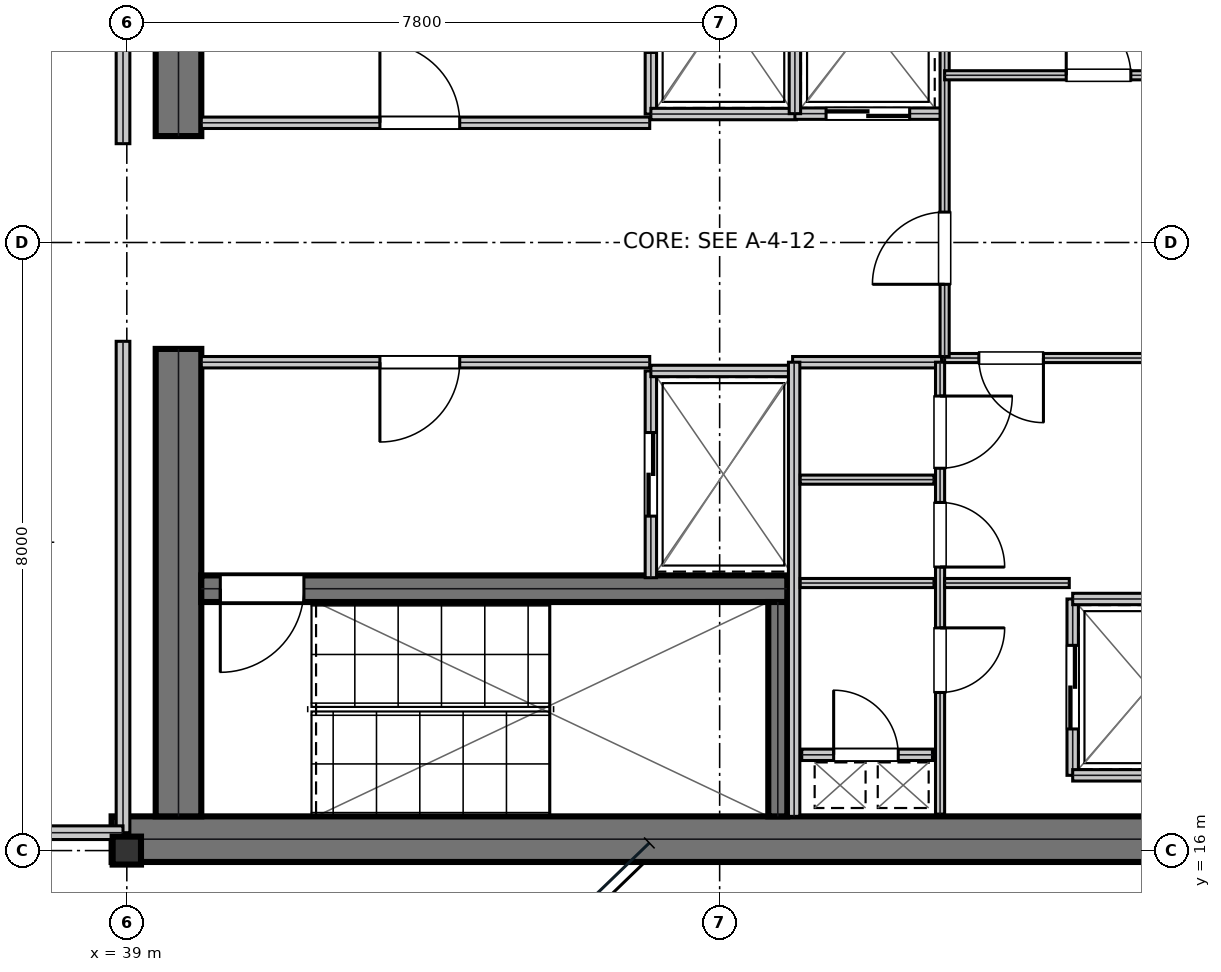
"""IFC4 building model, lengths in metres.
Left out: names, types, materials, properties, quantities, classifications, styles, units other than length and angle.
Written with IfcOpenShell. Run it as: python <this file> out.ifc"""

import sys

from ifc_helpers import new_model, si_unit, direction, frame, frame_2d, origin, origin_2d, place, context, subcontext, project, spatial, rectangle, i_section, extrude, element, fill, save


model = new_model("IFC4")
c1 = context("Model", 3, precision=1e-05, world=origin(), true_north=direction((0.0, 1.0)))
c2 = subcontext(c1, "Body", "Model", "MODEL_VIEW")
j1 = project(units=[si_unit("LENGTHUNIT", "METRE"), si_unit("PLANEANGLEUNIT", "RADIAN")], contexts=[c1])
p1 = place(None, origin())
s1 = spatial("IfcSite", under=j1, at=p1, CompositionType="ELEMENT")
p2 = place(p1, origin())
s2 = spatial("IfcBuilding", under=s1, at=p2, CompositionType="ELEMENT")
p3 = place(p2, frame((0.0, 0.0, 315.45)))
s3 = spatial("IfcBuildingStorey", under=s2, at=p3, CompositionType="ELEMENT", Elevation=315.45)
p4 = place(p3, frame((38.8, 16.15, 0.0), z_axis=(0.0, 0.0, 1.0), x_axis=(1.0, 0.0, 0.0)))
e1 = element("IfcWall", 1, at=p4, inside=s3, PredefinedType="SHEAR", context=c2, shape_type="SweptSolid", body=[
    extrude(rectangle(XDim=16.0, YDim=0.6, at=frame_2d((8.0, 0.0))), origin(), (0.0, 0.0, 1.0), 3.78),
])
for number, where, z_axis, x_axis in (
    (2, (39.68, 16.45, 0.0), (0.0, 0.0, 1.0), (0.0, 1.0, 0.0)),
    (3, (39.68, 25.4, 0.0), (0.0, 0.0, 1.0), (0.0, 1.0, 0.0)),
):
    element("IfcWall", number, at=place(p3, frame(where, z_axis=z_axis, x_axis=x_axis)), inside=s3, PredefinedType="SHEAR", context=c2, shape_type="SweptSolid", body=[
        extrude(rectangle(XDim=6.15, YDim=0.6, at=frame_2d((3.075, 0.0))), origin(), (0.0, 0.0, 1.0), 3.78),
    ])
p5 = place(p3, frame((39.98, 19.445, 0.0), z_axis=(0.0, 0.0, 1.0), x_axis=(1.0, 0.0, 0.0)))
e4 = element("IfcWall", 4, at=p5, inside=s3, PredefinedType="SHEAR", context=c2, shape_type="SweptSolid", body=[
    extrude(rectangle(XDim=7.71, YDim=0.35, at=frame_2d((3.855, 0.0))), origin(), (0.0, 0.0, 1.0), 3.78),
])
p6 = place(p5, frame((0.25, 0.0, 0.0)))
e5 = element("IfcOpeningElement", 5, at=p6, cuts=e4, PredefinedType="OPENING", context=c2, shape_type="SweptSolid", body=[
    extrude(rectangle(XDim=1.1, YDim=2.15, at=frame_2d((0.55, 1.075))), frame((0.0, 0.185, 0.0), z_axis=(0.0, -1.0, 0.0), x_axis=(1.0, 0.0, 0.0)), (0.0, 0.0, 1.0), 0.37),
])
p7 = place(p3, frame((47.565, 16.45, 0.0), z_axis=(0.0, 0.0, 1.0), x_axis=(0.0, 1.0, 0.0)))
e6 = element("IfcWall", 6, at=p7, inside=s3, PredefinedType="SHEAR", context=c2, shape_type="SweptSolid", body=[
    extrude(rectangle(XDim=2.82, YDim=0.25, at=frame_2d((1.41, 0.0))), origin(), (0.0, 0.0, 1.0), 3.78),
])
p8 = place(p3, frame((39.0, 16.0, 0.0), z_axis=(0.0, 0.0, 1.0), x_axis=(1.0, 0.0, 0.0)))
e7 = element("IfcColumn", 7, at=p8, inside=s3, PredefinedType="COLUMN", context=c2, shape_type="SweptSolid", body=[
    extrude(i_section(OverallWidth=0.373, OverallDepth=0.368, WebThickness=0.015, FlangeThickness=0.024, at=origin_2d()), origin(), (0.0, 0.0, 1.0), 4.044),
])
p9 = place(p3, frame((39.98, 25.575, 0.0), z_axis=(0.0, 0.0, 1.0), x_axis=(1.0, 0.0, 0.0)))
e8 = element("IfcWall", 8, at=p9, inside=s3, PredefinedType="PARTITIONING", context=c2, shape_type="SweptSolid", body=[
    extrude(rectangle(XDim=5.9, YDim=0.15, at=frame_2d((2.95, 0.0))), origin(), (0.0, 0.0, 1.0), 3.78),
])
p10 = place(p9, frame((2.35, 0.0, 0.0)))
e9 = element("IfcOpeningElement", 9, at=p10, cuts=e8, PredefinedType="OPENING", context=c2, shape_type="SweptSolid", body=[
    extrude(rectangle(XDim=1.05, YDim=2.15, at=frame_2d((0.525, 1.075))), frame((0.0, 0.085, 0.0), z_axis=(0.0, -1.0, 0.0), x_axis=(1.0, 0.0, 0.0)), (0.0, 0.0, 1.0), 0.17),
])
p11 = place(p3, frame((39.98, 22.425, 0.0), z_axis=(0.0, 0.0, 1.0), x_axis=(1.0, 0.0, 0.0)))
e10 = element("IfcWall", 10, at=p11, inside=s3, PredefinedType="PARTITIONING", context=c2, shape_type="SweptSolid", body=[
    extrude(rectangle(XDim=5.9, YDim=0.15, at=frame_2d((2.95, 0.0))), origin(), (0.0, 0.0, 1.0), 3.78),
])
p12 = place(p11, frame((2.35, 0.0, 0.0)))
e11 = element("IfcOpeningElement", 11, at=p12, cuts=e10, PredefinedType="OPENING", context=c2, shape_type="SweptSolid", body=[
    extrude(rectangle(XDim=1.05, YDim=2.15, at=frame_2d((0.525, 1.075))), frame((0.0, 0.085, 0.0), z_axis=(0.0, -1.0, 0.0), x_axis=(1.0, 0.0, 0.0)), (0.0, 0.0, 1.0), 0.17),
])
p13 = place(p3, frame((45.895, 25.69, 0.0), z_axis=(0.0, 0.0, 1.0), x_axis=(0.0, 1.0, 0.0)))
e12 = element("IfcWall", 12, at=p13, inside=s3, PredefinedType="PARTITIONING", context=c2, shape_type="SweptSolid", body=[
    extrude(rectangle(XDim=2.72, YDim=0.15, at=frame_2d((1.36, 0.0))), origin(), (0.0, 0.0, 1.0), 3.78),
])
p14 = place(p13, frame((0.81, 0.0, 0.0)))
e13 = element("IfcOpeningElement", 13, at=p14, cuts=e12, PredefinedType="OPENING", context=c2, shape_type="SweptSolid", body=[
    extrude(rectangle(XDim=1.1, YDim=2.15, at=frame_2d((0.55, 1.075))), frame((0.0, 0.085, 0.0), z_axis=(0.0, -1.0, 0.0), x_axis=(1.0, 0.0, 0.0)), (0.0, 0.0, 1.0), 0.17),
])
p15 = place(p3, frame((45.895, 25.69, 0.0), z_axis=(0.0, 0.0, 1.0), x_axis=(1.0, 0.0, 0.0)))
e14 = element("IfcWall", 14, at=p15, inside=s3, PredefinedType="PARTITIONING", context=c2, shape_type="SweptSolid", body=[
    extrude(rectangle(XDim=1.915, YDim=0.15, at=frame_2d((0.958, 0.0))), origin(), (0.0, 0.0, 1.0), 3.78),
])
p16 = place(p3, frame((45.895, 19.59, 0.0), z_axis=(0.0, 0.0, 1.0), x_axis=(0.0, 1.0, 0.0)))
e15 = element("IfcWall", 15, at=p16, inside=s3, PredefinedType="PARTITIONING", context=c2, shape_type="SweptSolid", body=[
    extrude(rectangle(XDim=2.72, YDim=0.15, at=frame_2d((1.36, 0.0))), origin(), (0.0, 0.0, 1.0), 3.78),
])
p17 = place(p16, frame((0.81, 0.0, 0.0)))
e16 = element("IfcOpeningElement", 16, at=p17, cuts=e15, PredefinedType="OPENING", context=c2, shape_type="SweptSolid", body=[
    extrude(rectangle(XDim=1.1, YDim=2.15, at=frame_2d((0.55, 1.075))), frame((0.0, 0.085, 0.0), z_axis=(0.0, -1.0, 0.0), x_axis=(1.0, 0.0, 0.0)), (0.0, 0.0, 1.0), 0.17),
])
p18 = place(p3, frame((45.895, 22.31, 0.0), z_axis=(0.0, 0.0, 1.0), x_axis=(1.0, 0.0, 0.0)))
e17 = element("IfcWall", 17, at=p18, inside=s3, PredefinedType="PARTITIONING", context=c2, shape_type="SweptSolid", body=[
    extrude(rectangle(XDim=1.915, YDim=0.15, at=frame_2d((0.958, 0.0))), origin(), (0.0, 0.0, 1.0), 3.78),
])
p19 = place(p3, frame((47.79, 25.695, 0.0), z_axis=(0.0, 0.0, 1.0), x_axis=(1.0, 0.0, 0.0)))
e18 = element("IfcWall", 18, at=p19, inside=s3, PredefinedType="PARTITIONING", context=c2, shape_type="SweptSolid", body=[
    extrude(rectangle(XDim=1.92, YDim=0.15, at=frame_2d((0.96, 0.0))), origin(), (0.0, 0.0, 1.0), 3.78),
])
p20 = place(p19, frame((0.41, 0.0, 0.0)))
e19 = element("IfcOpeningElement", 19, at=p20, cuts=e18, PredefinedType="OPENING", context=c2, shape_type="SweptSolid", body=[
    extrude(rectangle(XDim=1.1, YDim=2.15, at=frame_2d((0.55, 1.075))), frame((0.0, 0.085, 0.0), z_axis=(0.0, -1.0, 0.0), x_axis=(1.0, 0.0, 0.0)), (0.0, 0.0, 1.0), 0.17),
])
p21 = place(p3, frame((47.79, 25.695, 0.0), z_axis=(0.0, 0.0, 1.0), x_axis=(0.0, 1.0, 0.0)))
e20 = element("IfcWall", 20, at=p21, inside=s3, PredefinedType="PARTITIONING", context=c2, shape_type="SweptSolid", body=[
    extrude(rectangle(XDim=2.415, YDim=0.15, at=frame_2d((1.208, 0.0))), origin(), (0.0, 0.0, 1.0), 3.78),
])
p22 = place(p3, frame((51.445, 16.99, 0.0), z_axis=(0.0, 0.0, 1.0), x_axis=(0.0, 1.0, 0.0)))
e21 = element("IfcWall", 21, at=p22, inside=s3, PredefinedType="PARTITIONING", context=c2, shape_type="SweptSolid", body=[
    extrude(rectangle(XDim=2.32, YDim=0.15, at=frame_2d((1.16, 0.0))), origin(), (0.0, 0.0, 1.0), 3.78),
])
p23 = place(p22, frame((0.61, 0.0, 0.0)))
e22 = element("IfcOpeningElement", 22, at=p23, cuts=e21, PredefinedType="OPENING", context=c2, shape_type="SweptSolid", body=[
    extrude(rectangle(XDim=1.1, YDim=2.15, at=frame_2d((0.55, 1.075))), frame((0.0, 0.085, 0.0), z_axis=(0.0, -1.0, 0.0), x_axis=(1.0, 0.0, 0.0)), (0.0, 0.0, 1.0), 0.17),
])
for number, where, z_axis, x_axis in (
    (23, (51.445, 16.99, 0.0), (0.0, 0.0, 1.0), (1.0, 0.0, 0.0)),
    (24, (51.445, 19.31, 0.0), (0.0, 0.0, 1.0), (1.0, 0.0, 0.0)),
):
    element("IfcWall", number, at=place(p3, frame(where, z_axis=z_axis, x_axis=x_axis)), inside=s3, PredefinedType="PARTITIONING", context=c2, shape_type="SweptSolid", body=[
        extrude(rectangle(XDim=2.015, YDim=0.15, at=frame_2d((1.007, 0.0))), origin(), (0.0, 0.0, 1.0), 3.78),
    ])
p24 = place(p3, frame((47.88, 17.26, 0.0), z_axis=(0.0, 0.0, 1.0), x_axis=(1.0, 0.0, 0.0)))
e25 = element("IfcWall", 25, at=p24, inside=s3, PredefinedType="PARTITIONING", context=c2, shape_type="SweptSolid", body=[
    extrude(rectangle(XDim=1.72, YDim=0.15, at=frame_2d((0.86, 0.0))), origin(), (0.0, 0.0, 1.0), 3.78),
])
p25 = place(p24, frame((0.42, 0.0, 0.0)))
e26 = element("IfcOpeningElement", 26, at=p25, cuts=e25, PredefinedType="OPENING", context=c2, shape_type="SweptSolid", body=[
    extrude(rectangle(XDim=0.85, YDim=2.15, at=frame_2d((0.425, 1.075))), frame((0.0, 0.085, 0.0), z_axis=(0.0, -1.0, 0.0), x_axis=(1.0, 0.0, 0.0)), (0.0, 0.0, 1.0), 0.17),
])
p26 = place(p3, frame((47.76, 22.425, 0.0), z_axis=(0.0, 0.0, 1.0), x_axis=(1.0, 0.0, 0.0)))
e27 = element("IfcWall", 27, at=p26, inside=s3, PredefinedType="PARTITIONING", context=c2, shape_type="SweptSolid", body=[
    extrude(rectangle(XDim=1.96, YDim=0.15, at=frame_2d((0.98, 0.0))), origin(), (0.0, 0.0, 1.0), 3.78),
])
p27 = place(p3, frame((47.78, 16.45, 0.0), z_axis=(0.0, 0.0, 1.0), x_axis=(0.0, 1.0, 0.0)))
e28 = element("IfcWall", 28, at=p27, inside=s3, PredefinedType="PARTITIONING", context=c2, shape_type="SweptSolid", body=[
    extrude(rectangle(XDim=5.975, YDim=0.15, at=frame_2d((2.988, 0.0))), origin(), (0.0, 0.0, 1.0), 3.78),
])
for number, where, z_axis, x_axis in (
    (29, (47.86, 19.52, 0.0), (0.0, 0.0, 1.0), (1.0, 0.0, 0.0)),
    (30, (47.86, 20.88, 0.0), (0.0, 0.0, 1.0), (1.0, 0.0, 0.0)),
):
    element("IfcWall", number, at=place(p3, frame(where, z_axis=z_axis, x_axis=x_axis)), inside=s3, PredefinedType="PARTITIONING", context=c2, shape_type="SweptSolid", body=[
        extrude(rectangle(XDim=1.76, YDim=0.12, at=frame_2d((0.88, 0.0))), origin(), (0.0, 0.0, 1.0), 3.78),
    ])
p28 = place(p3, frame((49.7, 16.48, 0.0), z_axis=(0.0, 0.0, 1.0), x_axis=(0.0, 1.0, 0.0)))
e31 = element("IfcWall", 31, at=p28, inside=s3, PredefinedType="PARTITIONING", context=c2, shape_type="SweptSolid", body=[
    extrude(rectangle(XDim=5.945, YDim=0.12, at=frame_2d((2.973, 0.0))), origin(), (0.0, 0.0, 1.0), 3.78),
])
p29 = place(p28, frame((1.6, 0.0, 0.0)))
e32 = element("IfcOpeningElement", 32, at=p29, cuts=e31, PredefinedType="OPENING", context=c2, shape_type="SweptSolid", body=[
    extrude(rectangle(XDim=0.85, YDim=2.15, at=frame_2d((0.425, 1.075))), frame((0.0, 0.07, 0.0), z_axis=(0.0, -1.0, 0.0), x_axis=(1.0, 0.0, 0.0)), (0.0, 0.0, 1.0), 0.14),
])
p30 = place(p28, frame((3.25, 0.0, 0.0)))
e33 = element("IfcOpeningElement", 33, at=p30, cuts=e31, PredefinedType="OPENING", context=c2, shape_type="SweptSolid", body=[
    extrude(rectangle(XDim=0.85, YDim=2.15, at=frame_2d((0.425, 1.075))), frame((0.0, 0.07, 0.0), z_axis=(0.0, -1.0, 0.0), x_axis=(1.0, 0.0, 0.0)), (0.0, 0.0, 1.0), 0.14),
])
p31 = place(p28, frame((4.55, 0.0, 0.0)))
e34 = element("IfcOpeningElement", 34, at=p31, cuts=e31, PredefinedType="OPENING", context=c2, shape_type="SweptSolid", body=[
    extrude(rectangle(XDim=0.95, YDim=2.15, at=frame_2d((0.475, 1.075))), frame((0.0, 0.07, 0.0), z_axis=(0.0, -1.0, 0.0), x_axis=(1.0, 0.0, 0.0)), (0.0, 0.0, 1.0), 0.14),
])
p32 = place(p3, frame((49.76, 22.48, 0.0), z_axis=(0.0, 0.0, 1.0), x_axis=(1.0, 0.0, 0.0)))
e35 = element("IfcWall", 35, at=p32, inside=s3, PredefinedType="PARTITIONING", context=c2, shape_type="SweptSolid", body=[
    extrude(rectangle(XDim=3.9, YDim=0.12, at=frame_2d((1.95, 0.0))), origin(), (0.0, 0.0, 1.0), 3.78),
])
p33 = place(p32, frame((0.45, 0.0, 0.0)))
e36 = element("IfcOpeningElement", 36, at=p33, cuts=e35, PredefinedType="OPENING", context=c2, shape_type="SweptSolid", body=[
    extrude(rectangle(XDim=0.85, YDim=2.15, at=frame_2d((0.425, 1.075))), frame((0.0, 0.07, 0.0), z_axis=(0.0, -1.0, 0.0), x_axis=(1.0, 0.0, 0.0)), (0.0, 0.0, 1.0), 0.14),
])
p34 = place(p3, frame((49.76, 19.52, 0.0), z_axis=(0.0, 0.0, 1.0), x_axis=(1.0, 0.0, 0.0)))
e37 = element("IfcWall", 37, at=p34, inside=s3, PredefinedType="PARTITIONING", context=c2, shape_type="SweptSolid", body=[
    extrude(rectangle(XDim=1.64, YDim=0.12, at=frame_2d((0.82, 0.0))), origin(), (0.0, 0.0, 1.0), 3.78),
])
p35 = place(p3, frame((49.76, 22.5, 0.0), z_axis=(0.0, 0.0, 1.0), x_axis=(0.0, 1.0, 0.0)))
e38 = element("IfcWall", 38, at=p35, inside=s3, PredefinedType="PARTITIONING", context=c2, shape_type="SweptSolid", body=[
    extrude(rectangle(XDim=5.72, YDim=0.12, at=frame_2d((2.86, 0.0))), origin(), (0.0, 0.0, 1.0), 3.78),
])
p36 = place(p35, frame((0.95, 0.0, 0.0)))
e39 = element("IfcOpeningElement", 39, at=p36, cuts=e38, PredefinedType="OPENING", context=c2, shape_type="SweptSolid", body=[
    extrude(rectangle(XDim=0.95, YDim=2.15, at=frame_2d((0.475, 1.075))), frame((0.0, 0.07, 0.0), z_axis=(0.0, -1.0, 0.0), x_axis=(1.0, 0.0, 0.0)), (0.0, 0.0, 1.0), 0.14),
])
p37 = place(p3, frame((49.76, 26.2, 0.0), z_axis=(0.0, 0.0, 1.0), x_axis=(1.0, 0.0, 0.0)))
e40 = element("IfcWall", 40, at=p37, inside=s3, PredefinedType="PARTITIONING", context=c2, shape_type="SweptSolid", body=[
    extrude(rectangle(XDim=3.9, YDim=0.12, at=frame_2d((1.95, 0.0))), origin(), (0.0, 0.0, 1.0), 3.78),
])
p38 = place(p37, frame((1.6, 0.0, 0.0)))
e41 = element("IfcOpeningElement", 41, at=p38, cuts=e40, PredefinedType="OPENING", context=c2, shape_type="SweptSolid", body=[
    extrude(rectangle(XDim=0.85, YDim=2.15, at=frame_2d((0.425, 1.075))), frame((0.0, 0.07, 0.0), z_axis=(0.0, -1.0, 0.0), x_axis=(1.0, 0.0, 0.0)), (0.0, 0.0, 1.0), 0.14),
])
p39 = place(p3, frame((38.95, 16.235, 0.0), z_axis=(0.0, 0.0, 1.0), x_axis=(0.0, 1.0, 0.0)))
e42 = element("IfcWall", 42, at=p39, inside=s3, PredefinedType="SOLIDWALL", context=c2, shape_type="SweptSolid", body=[
    extrude(rectangle(XDim=6.465, YDim=0.18, at=frame_2d((3.232, 0.0))), origin(), (0.0, 0.0, 1.0), 2.856),
])
p40 = place(p3, frame((37.05, 16.235, 0.0), z_axis=(0.0, 0.0, 1.0), x_axis=(1.0, 0.0, 0.0)))
e43 = element("IfcWall", 43, at=p40, inside=s3, PredefinedType="SOLIDWALL", context=c2, shape_type="SweptSolid", body=[
    extrude(rectangle(XDim=1.9, YDim=0.18, at=frame_2d((0.95, 0.0))), origin(), (0.0, 0.0, 1.0), 3.24),
])
p41 = place(p3, frame((38.95, 25.3, 0.0), z_axis=(0.0, 0.0, 1.0), x_axis=(0.0, 1.0, 0.0)))
e44 = element("IfcWall", 44, at=p41, inside=s3, PredefinedType="SOLIDWALL", context=c2, shape_type="SweptSolid", body=[
    extrude(rectangle(XDim=6.465, YDim=0.18, at=frame_2d((3.232, 0.0))), origin(), (0.0, 0.0, 1.0), 2.856),
])
p42 = place(p10, origin())
e45 = element("IfcDoor", 45, at=p42, inside=s3, OperationType="SINGLE_SWING_LEFT", PredefinedType="DOOR", context=c2, shape_type="SweptSolid", body=[
    extrude(rectangle(XDim=1.05, YDim=2.15, at=frame_2d((0.525, 1.075))), frame((0.0, 0.025, 0.0), z_axis=(0.0, -1.0, 0.0), x_axis=(1.0, 0.0, 0.0)), (0.0, 0.0, 1.0), 0.05),
])
fill(e9, e45)
p43 = place(p12, frame((1.05, 0.0, 0.0), z_axis=(0.0, 0.0, 1.0), x_axis=(-1.0, 0.0, 0.0)))
e46 = element("IfcDoor", 46, at=p43, inside=s3, OperationType="SINGLE_SWING_RIGHT", PredefinedType="DOOR", context=c2, shape_type="SweptSolid", body=[
    extrude(rectangle(XDim=1.05, YDim=2.15, at=frame_2d((0.525, 1.075))), frame((0.0, 0.025, 0.0), z_axis=(0.0, -1.0, 0.0), x_axis=(1.0, 0.0, 0.0)), (0.0, 0.0, 1.0), 0.05),
])
fill(e11, e46)
p44 = place(p17, frame((1.1, 0.0, 0.0), z_axis=(0.0, 0.0, 1.0), x_axis=(-1.0, 0.0, 0.0)))
e47 = element("IfcDoor", 47, at=p44, inside=s3, OperationType="DOUBLE_DOOR_SLIDING", PredefinedType="DOOR", context=c2, shape_type="SweptSolid", body=[
    extrude(rectangle(XDim=1.1, YDim=2.15, at=frame_2d((0.55, 1.075))), frame((0.0, 0.025, 0.0), z_axis=(0.0, -1.0, 0.0), x_axis=(1.0, 0.0, 0.0)), (0.0, 0.0, 1.0), 0.05),
])
fill(e16, e47)
p45 = place(p20, frame((1.1, 0.0, 0.0), z_axis=(0.0, 0.0, 1.0), x_axis=(-1.0, 0.0, 0.0)))
e48 = element("IfcDoor", 48, at=p45, inside=s3, OperationType="DOUBLE_DOOR_SLIDING", PredefinedType="DOOR", context=c2, shape_type="SweptSolid", body=[
    extrude(rectangle(XDim=1.1, YDim=2.15, at=frame_2d((0.55, 1.075))), frame((0.0, 0.025, 0.0), z_axis=(0.0, -1.0, 0.0), x_axis=(1.0, 0.0, 0.0)), (0.0, 0.0, 1.0), 0.05),
])
fill(e19, e48)
p46 = place(p23, frame((1.1, 0.0, 0.0), z_axis=(0.0, 0.0, 1.0), x_axis=(-1.0, 0.0, 0.0)))
e49 = element("IfcDoor", 49, at=p46, inside=s3, OperationType="DOUBLE_DOOR_SLIDING", PredefinedType="DOOR", context=c2, shape_type="SweptSolid", body=[
    extrude(rectangle(XDim=1.1, YDim=2.15, at=frame_2d((0.55, 1.075))), frame((0.0, 0.025, 0.0), z_axis=(0.0, -1.0, 0.0), x_axis=(1.0, 0.0, 0.0)), (0.0, 0.0, 1.0), 0.05),
])
fill(e22, e49)
p47 = place(p25, origin())
e50 = element("IfcDoor", 50, at=p47, inside=s3, OperationType="SINGLE_SWING_LEFT", PredefinedType="TRAPDOOR", context=c2, shape_type="SweptSolid", body=[
    extrude(rectangle(XDim=0.85, YDim=2.15, at=frame_2d((0.425, 1.075))), frame((0.0, 0.025, 0.0), z_axis=(0.0, -1.0, 0.0), x_axis=(1.0, 0.0, 0.0)), (0.0, 0.0, 1.0), 0.05),
])
fill(e26, e50)
p48 = place(p29, frame((0.85, 0.0, 0.0), z_axis=(0.0, 0.0, 1.0), x_axis=(-1.0, 0.0, 0.0)))
e51 = element("IfcDoor", 51, at=p48, inside=s3, OperationType="SINGLE_SWING_LEFT", PredefinedType="DOOR", context=c2, shape_type="SweptSolid", body=[
    extrude(rectangle(XDim=0.85, YDim=2.15, at=frame_2d((0.425, 1.075))), frame((0.0, 0.025, 0.0), z_axis=(0.0, -1.0, 0.0), x_axis=(1.0, 0.0, 0.0)), (0.0, 0.0, 1.0), 0.05),
])
fill(e32, e51)
p49 = place(p30, frame((0.85, 0.0, 0.0), z_axis=(0.0, 0.0, 1.0), x_axis=(-1.0, 0.0, 0.0)))
e52 = element("IfcDoor", 52, at=p49, inside=s3, OperationType="SINGLE_SWING_RIGHT", PredefinedType="DOOR", context=c2, shape_type="SweptSolid", body=[
    extrude(rectangle(XDim=0.85, YDim=2.15, at=frame_2d((0.425, 1.075))), frame((0.0, 0.025, 0.0), z_axis=(0.0, -1.0, 0.0), x_axis=(1.0, 0.0, 0.0)), (0.0, 0.0, 1.0), 0.05),
])
fill(e33, e52)
p50 = place(p31, frame((0.95, 0.0, 0.0), z_axis=(0.0, 0.0, 1.0), x_axis=(-1.0, 0.0, 0.0)))
e53 = element("IfcDoor", 53, at=p50, inside=s3, OperationType="SINGLE_SWING_LEFT", PredefinedType="DOOR", context=c2, shape_type="SweptSolid", body=[
    extrude(rectangle(XDim=0.95, YDim=2.15, at=frame_2d((0.475, 1.075))), frame((0.0, 0.025, 0.0), z_axis=(0.0, -1.0, 0.0), x_axis=(1.0, 0.0, 0.0)), (0.0, 0.0, 1.0), 0.05),
])
fill(e34, e53)
p51 = place(p33, frame((0.85, 0.0, 0.0), z_axis=(0.0, 0.0, 1.0), x_axis=(-1.0, 0.0, 0.0)))
e54 = element("IfcDoor", 54, at=p51, inside=s3, OperationType="SINGLE_SWING_LEFT", PredefinedType="DOOR", context=c2, shape_type="SweptSolid", body=[
    extrude(rectangle(XDim=0.85, YDim=2.15, at=frame_2d((0.425, 1.075))), frame((0.0, 0.025, 0.0), z_axis=(0.0, -1.0, 0.0), x_axis=(1.0, 0.0, 0.0)), (0.0, 0.0, 1.0), 0.05),
])
fill(e36, e54)
p52 = place(p36, origin())
e55 = element("IfcDoor", 55, at=p52, inside=s3, OperationType="SINGLE_SWING_LEFT", PredefinedType="DOOR", context=c2, shape_type="SweptSolid", body=[
    extrude(rectangle(XDim=0.95, YDim=2.15, at=frame_2d((0.475, 1.075))), frame((0.0, 0.025, 0.0), z_axis=(0.0, -1.0, 0.0), x_axis=(1.0, 0.0, 0.0)), (0.0, 0.0, 1.0), 0.05),
])
fill(e39, e55)
p53 = place(p38, origin())
e56 = element("IfcDoor", 56, at=p53, inside=s3, OperationType="SINGLE_SWING_LEFT", PredefinedType="DOOR", context=c2, shape_type="SweptSolid", body=[
    extrude(rectangle(XDim=0.85, YDim=2.15, at=frame_2d((0.425, 1.075))), frame((0.0, 0.025, 0.0), z_axis=(0.0, -1.0, 0.0), x_axis=(1.0, 0.0, 0.0)), (0.0, 0.0, 1.0), 0.05),
])
fill(e41, e56)
p54 = place(p6, frame((1.1, 0.0, 0.0), z_axis=(0.0, 0.0, 1.0), x_axis=(-1.0, 0.0, 0.0)))
e57 = element("IfcDoor", 57, at=p54, inside=s3, OperationType="SINGLE_SWING_RIGHT", PredefinedType="DOOR", context=c2, shape_type="SweptSolid", body=[
    extrude(rectangle(XDim=1.1, YDim=2.15, at=frame_2d((0.55, 1.075))), frame((0.0, 0.025, 0.0), z_axis=(0.0, -1.0, 0.0), x_axis=(1.0, 0.0, 0.0)), (0.0, 0.0, 1.0), 0.05),
])
fill(e5, e57)
save(model, sys.argv[1])
